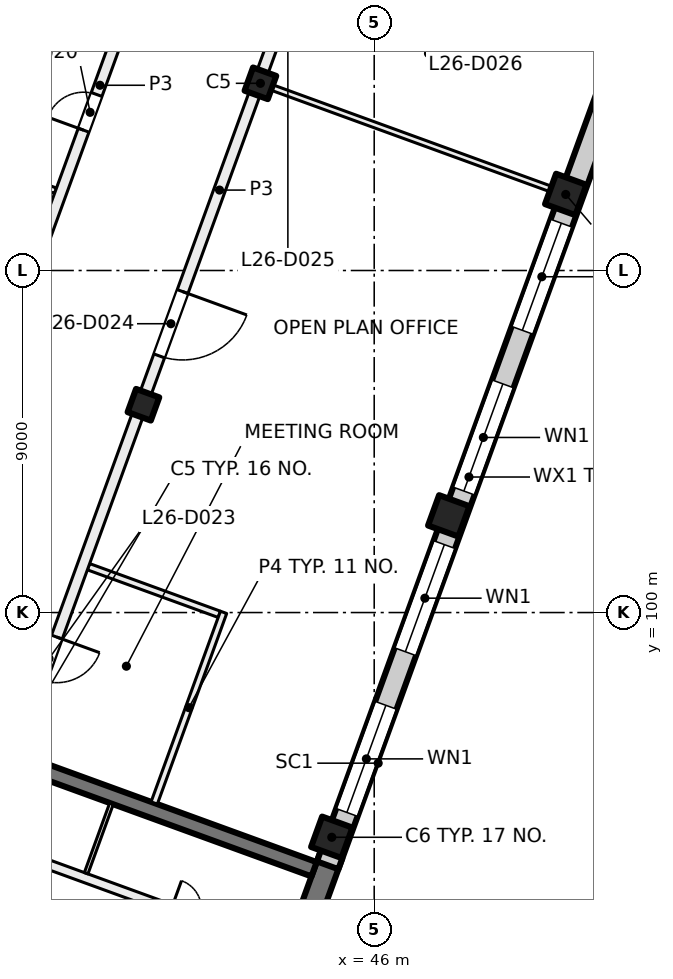
"""IFC4 building model, lengths in metres.
Left out: names, types, materials, properties, quantities, classifications, styles, units other than length and angle.
Written with IfcOpenShell. Run it as: python <this file> out.ifc"""

import sys

from ifc_helpers import new_model, si_unit, direction, frame, frame_2d, origin, origin_2d, place, context, subcontext, project, spatial, rectangle, extrude, element, fill, save


model = new_model("IFC4")
c1 = context("Model", 3, precision=1e-05, world=origin(), true_north=direction((0.0, 1.0)))
c2 = subcontext(c1, "Body", "Model", "MODEL_VIEW")
j1 = project(units=[si_unit("LENGTHUNIT", "METRE"), si_unit("PLANEANGLEUNIT", "RADIAN")], contexts=[c1])
p1 = place(None, origin())
s1 = spatial("IfcSite", under=j1, at=p1, CompositionType="ELEMENT")
p2 = place(p1, origin())
s2 = spatial("IfcBuilding", under=s1, at=p2, CompositionType="ELEMENT")
p3 = place(p2, frame((0.0, 0.0, 113.0)))
s3 = spatial("IfcBuildingStorey", under=s2, at=p3, CompositionType="ELEMENT", Elevation=113.0)
for number, where, z_axis, x_axis in (
    (1, (43.006, 113.925, 0.0), (0.0, 0.0, 1.0), (-0.342, -0.94, 0.0)),
    (2, (39.927, 105.468, 0.0), (0.0, 0.0, 1.0), (-0.342, -0.94, 0.0)),
):
    element("IfcColumn", number, at=place(p3, frame(where, z_axis=z_axis, x_axis=x_axis)), inside=s3, PredefinedType="COLUMN", context=c2, shape_type="SweptSolid", body=[
        extrude(rectangle(XDim=0.65, YDim=0.65, at=origin_2d()), origin(), (0.0, 0.0, 1.0), 4.0),
    ])
for number, where, z_axis, x_axis in (
    (3, (51.04, 111.001, 0.0), (0.0, 0.0, 1.0), (-0.342, -0.94, 0.0)),
    (4, (47.962, 102.544, 0.0), (0.0, 0.0, 1.0), (-0.342, -0.94, 0.0)),
    (5, (44.884, 94.087, 0.0), (0.0, 0.0, 1.0), (-0.342, -0.94, 0.0)),
):
    element("IfcColumn", number, at=place(p3, frame(where, z_axis=z_axis, x_axis=x_axis)), inside=s3, PredefinedType="COLUMN", context=c2, shape_type="SweptSolid", body=[
        extrude(rectangle(XDim=0.85, YDim=0.85, at=origin_2d()), origin(), (0.0, 0.0, 1.0), 4.0),
    ])
p4 = place(p3, frame((41.827, 85.249, 0.0), z_axis=(0.0, 0.0, 1.0), x_axis=(0.342017595281, 0.939693548195, 0.0)))
e6 = element("IfcWall", 6, at=p4, inside=s3, PredefinedType="SHEAR", context=c2, shape_type="SweptSolid", body=[
    extrude(rectangle(XDim=8.925, YDim=0.6, at=frame_2d((4.462, 0.0))), origin(), (0.0, 0.0, 1.0), 4.0),
])
p5 = place(p3, frame((44.418, 93.245, 0.0), z_axis=(0.0, 0.0, 1.0), x_axis=(-0.93969060187, 0.342025690201, 0.0)))
e7 = element("IfcWall", 7, at=p5, inside=s3, PredefinedType="SHEAR", context=c2, shape_type="SweptSolid", body=[
    extrude(rectangle(XDim=8.6, YDim=0.4, at=frame_2d((4.3, 0.0))), origin(), (0.0, 0.0, 1.0), 4.0),
])
p6 = place(p3, frame((52.212, 113.783, 0.0), z_axis=(0.0, 0.0, 1.0), x_axis=(-0.34202521188, -0.939690775968, 0.0)))
e8 = element("IfcWall", 8, at=p6, inside=s3, PredefinedType="SOLIDWALL", context=c2, shape_type="SweptSolid", body=[
    extrude(rectangle(XDim=21.745, YDim=0.6, at=frame_2d((10.873, 0.0))), origin(), (0.0, 0.0, 1.0), 3.625),
])
p7 = place(p6, frame((3.765, 0.0, 0.9)))
e9 = element("IfcOpeningElement", 9, at=p7, cuts=e8, PredefinedType="OPENING", context=c2, shape_type="SweptSolid", body=[
    extrude(rectangle(XDim=3.0, YDim=2.4, at=frame_2d((1.5, 1.2))), frame((0.0, 0.31, 0.0), z_axis=(0.0, -1.0, 0.0), x_axis=(1.0, 0.0, 0.0)), (0.0, 0.0, 1.0), 0.62),
])
p8 = place(p6, frame((8.265, 0.0, 0.9)))
e10 = element("IfcOpeningElement", 10, at=p8, cuts=e8, PredefinedType="OPENING", context=c2, shape_type="SweptSolid", body=[
    extrude(rectangle(XDim=3.0, YDim=2.4, at=frame_2d((1.5, 1.2))), frame((0.0, 0.31, 0.0), z_axis=(0.0, -1.0, 0.0), x_axis=(1.0, 0.0, 0.0)), (0.0, 0.0, 1.0), 0.62),
])
p9 = place(p6, frame((12.765, 0.0, 0.9)))
e11 = element("IfcOpeningElement", 11, at=p9, cuts=e8, PredefinedType="OPENING", context=c2, shape_type="SweptSolid", body=[
    extrude(rectangle(XDim=3.0, YDim=2.4, at=frame_2d((1.5, 1.2))), frame((0.0, 0.31, 0.0), z_axis=(0.0, -1.0, 0.0), x_axis=(1.0, 0.0, 0.0)), (0.0, 0.0, 1.0), 0.62),
])
p10 = place(p6, frame((17.265, 0.0, 0.9)))
e12 = element("IfcOpeningElement", 12, at=p10, cuts=e8, PredefinedType="OPENING", context=c2, shape_type="SweptSolid", body=[
    extrude(rectangle(XDim=3.0, YDim=2.4, at=frame_2d((1.5, 1.2))), frame((0.0, 0.31, 0.0), z_axis=(0.0, -1.0, 0.0), x_axis=(1.0, 0.0, 0.0)), (0.0, 0.0, 1.0), 0.62),
])
p11 = place(p3, frame((35.19, 92.453, 0.0), z_axis=(0.0, 0.0, 1.0), x_axis=(0.939691552312, -0.342023078919, 0.0)))
e13 = element("IfcWall", 13, at=p11, inside=s3, PredefinedType="PARTITIONING", context=c2, shape_type="SweptSolid", body=[
    extrude(rectangle(XDim=8.4, YDim=0.2, at=frame_2d((4.2, 0.0))), origin(), (0.0, 0.0, 1.0), 3.625),
])
p12 = place(p11, frame((5.25, 0.0, 0.0)))
e14 = element("IfcOpeningElement", 14, at=p12, cuts=e13, PredefinedType="OPENING", context=c2, shape_type="SweptSolid", body=[
    extrude(rectangle(XDim=1.5, YDim=2.1, at=frame_2d((0.75, 1.05))), frame((0.0, 0.11, 0.0), z_axis=(0.0, -1.0, 0.0), x_axis=(1.0, 0.0, 0.0)), (0.0, 0.0, 1.0), 0.22),
])
p13 = place(p3, frame((35.746, 93.98, 0.0), z_axis=(0.0, 0.0, 1.0), x_axis=(0.939691552312, -0.342023078919, 0.0)))
e15 = element("IfcWall", 15, at=p13, inside=s3, PredefinedType="PARTITIONING", context=c2, shape_type="SweptSolid", body=[
    extrude(rectangle(XDim=8.4, YDim=0.25, at=frame_2d((4.2, 0.0))), origin(), (0.0, 0.0, 1.0), 3.625),
])
p14 = place(p13, frame((0.975, 0.0, 0.0)))
e16 = element("IfcOpeningElement", 16, at=p14, cuts=e15, PredefinedType="OPENING", context=c2, shape_type="SweptSolid", body=[
    extrude(rectangle(XDim=0.8, YDim=2.1, at=frame_2d((0.4, 1.05))), frame((0.0, 0.135, 0.0), z_axis=(0.0, -1.0, 0.0), x_axis=(1.0, 0.0, 0.0)), (0.0, 0.0, 1.0), 0.27),
])
p15 = place(p13, frame((5.225, 0.0, 0.0)))
e17 = element("IfcOpeningElement", 17, at=p15, cuts=e15, PredefinedType="OPENING", context=c2, shape_type="SweptSolid", body=[
    extrude(rectangle(XDim=0.8, YDim=2.1, at=frame_2d((0.4, 1.05))), frame((0.0, 0.135, 0.0), z_axis=(0.0, -1.0, 0.0), x_axis=(1.0, 0.0, 0.0)), (0.0, 0.0, 1.0), 0.27),
])
p16 = place(p3, frame((39.087, 94.973, 0.0), z_axis=(0.0, 0.0, 1.0), x_axis=(-0.342024501273, -0.939691034611, 0.0)))
e18 = element("IfcWall", 18, at=p16, inside=s3, PredefinedType="PARTITIONING", context=c2, shape_type="SweptSolid", body=[
    extrude(rectangle(XDim=1.95, YDim=0.1, at=frame_2d((0.975, 0.0))), origin(), (0.0, 0.0, 1.0), 3.625),
])
p17 = place(p3, frame((29.814, 113.938, 0.0), z_axis=(0.0, 0.0, 1.0), x_axis=(0.939697205528, -0.342007546586, 0.0)))
e19 = element("IfcWall", 19, at=p17, inside=s3, PredefinedType="PARTITIONING", context=c2, shape_type="SweptSolid", body=[
    extrude(rectangle(XDim=8.301, YDim=0.15, at=frame_2d((4.15, 0.0))), origin(), (0.0, 0.0, 1.0), 3.625),
])
p18 = place(p3, frame((32.881, 97.657, 0.0), z_axis=(0.0, 0.0, 1.0), x_axis=(0.342017360004, 0.939693633828, 0.0)))
e20 = element("IfcWall", 20, at=p18, inside=s3, PredefinedType="PARTITIONING", context=c2, shape_type="SweptSolid", body=[
    extrude(rectangle(XDim=34.516, YDim=0.3, at=frame_2d((17.258, 0.0))), origin(), (0.0, 0.0, 1.0), 3.625),
])
p19 = place(p18, frame((2.025, 0.0, 0.0)))
e21 = element("IfcOpeningElement", 21, at=p19, cuts=e20, PredefinedType="OPENING", context=c2, shape_type="SweptSolid", body=[
    extrude(rectangle(XDim=1.2, YDim=2.1, at=frame_2d((0.6, 1.05))), frame((0.0, 0.16, 0.0), z_axis=(0.0, -1.0, 0.0), x_axis=(1.0, 0.0, 0.0)), (0.0, 0.0, 1.0), 0.32),
])
p20 = place(p18, frame((7.0, 0.0, 0.0)))
e22 = element("IfcOpeningElement", 22, at=p20, cuts=e20, PredefinedType="OPENING", context=c2, shape_type="SweptSolid", body=[
    extrude(rectangle(XDim=1.0, YDim=2.1, at=frame_2d((0.5, 1.05))), frame((0.0, 0.16, 0.0), z_axis=(0.0, -1.0, 0.0), x_axis=(1.0, 0.0, 0.0)), (0.0, 0.0, 1.0), 0.32),
])
p21 = place(p18, frame((11.5, 0.0, 0.0)))
e23 = element("IfcOpeningElement", 23, at=p21, cuts=e20, PredefinedType="OPENING", context=c2, shape_type="SweptSolid", body=[
    extrude(rectangle(XDim=1.0, YDim=2.1, at=frame_2d((0.5, 1.05))), frame((0.0, 0.16, 0.0), z_axis=(0.0, -1.0, 0.0), x_axis=(1.0, 0.0, 0.0)), (0.0, 0.0, 1.0), 0.32),
])
p22 = place(p18, frame((16.0, 0.0, 0.0)))
e24 = element("IfcOpeningElement", 24, at=p22, cuts=e20, PredefinedType="OPENING", context=c2, shape_type="SweptSolid", body=[
    extrude(rectangle(XDim=1.0, YDim=2.1, at=frame_2d((0.5, 1.05))), frame((0.0, 0.16, 0.0), z_axis=(0.0, -1.0, 0.0), x_axis=(1.0, 0.0, 0.0)), (0.0, 0.0, 1.0), 0.32),
])
p23 = place(p18, frame((20.5, 0.0, 0.0)))
e25 = element("IfcOpeningElement", 25, at=p23, cuts=e20, PredefinedType="OPENING", context=c2, shape_type="SweptSolid", body=[
    extrude(rectangle(XDim=1.0, YDim=2.1, at=frame_2d((0.5, 1.05))), frame((0.0, 0.16, 0.0), z_axis=(0.0, -1.0, 0.0), x_axis=(1.0, 0.0, 0.0)), (0.0, 0.0, 1.0), 0.32),
])
p24 = place(p18, frame((25.0, 0.0, 0.0)))
e26 = element("IfcOpeningElement", 26, at=p24, cuts=e20, PredefinedType="OPENING", context=c2, shape_type="SweptSolid", body=[
    extrude(rectangle(XDim=1.0, YDim=2.1, at=frame_2d((0.5, 1.05))), frame((0.0, 0.16, 0.0), z_axis=(0.0, -1.0, 0.0), x_axis=(1.0, 0.0, 0.0)), (0.0, 0.0, 1.0), 0.32),
])
p25 = place(p18, frame((29.779, 0.0, 0.0)))
e27 = element("IfcOpeningElement", 27, at=p25, cuts=e20, PredefinedType="OPENING", context=c2, shape_type="SweptSolid", body=[
    extrude(rectangle(XDim=1.8, YDim=2.1, at=frame_2d((0.9, 1.05))), frame((0.0, 0.16, 0.0), z_axis=(0.0, -1.0, 0.0), x_axis=(1.0, 0.0, 0.0)), (0.0, 0.0, 1.0), 0.32),
])
p26 = place(p3, frame((38.482, 101.206, 0.0), z_axis=(0.0, 0.0, 1.0), x_axis=(0.939662978983, -0.342101572531, 0.0)))
e28 = element("IfcWall", 28, at=p26, inside=s3, PredefinedType="PARTITIONING", context=c2, shape_type="SweptSolid", body=[
    extrude(rectangle(XDim=3.663, YDim=0.175, at=frame_2d((1.832, 0.0))), origin(), (0.0, 0.0, 1.0), 3.625),
])
p27 = place(p3, frame((42.036, 100.005, 0.0), z_axis=(0.0, 0.0, 1.0), x_axis=(-0.341908323648, -0.939733312286, 0.0)))
e29 = element("IfcWall", 29, at=p27, inside=s3, PredefinedType="PARTITIONING", context=c2, shape_type="SweptSolid", body=[
    extrude(rectangle(XDim=5.338, YDim=0.175, at=frame_2d((2.669, 0.0))), origin(), (0.0, 0.0, 1.0), 3.625),
])
p28 = place(p3, frame((43.1, 113.891, 0.0), z_axis=(0.0, 0.0, 1.0), x_axis=(0.939670544866, -0.342080790328, 0.0)))
e30 = element("IfcWall", 30, at=p28, inside=s3, PredefinedType="PARTITIONING", context=c2, shape_type="SweptSolid", body=[
    extrude(rectangle(XDim=8.3, YDim=0.15, at=frame_2d((4.15, 0.0))), origin(), (0.0, 0.0, 1.0), 3.625),
])
p29 = place(p3, frame((47.314, 125.909, 0.0), z_axis=(0.0, 0.0, 1.0), x_axis=(-0.342010770371, -0.939696032209, 0.0)))
e31 = element("IfcWall", 31, at=p29, inside=s3, PredefinedType="PARTITIONING", context=c2, shape_type="SweptSolid", body=[
    extrude(rectangle(XDim=31.485, YDim=0.3, at=frame_2d((15.742, 0.0))), origin(), (0.0, 0.0, 1.0), 3.625),
])
p30 = place(p29, frame((28.259, 0.0, 0.0)))
e32 = element("IfcOpeningElement", 32, at=p30, cuts=e31, PredefinedType="OPENING", context=c2, shape_type="SweptSolid", body=[
    extrude(rectangle(XDim=1.2, YDim=2.1, at=frame_2d((0.6, 1.05))), frame((0.0, 0.16, 0.0), z_axis=(0.0, -1.0, 0.0), x_axis=(1.0, 0.0, 0.0)), (0.0, 0.0, 1.0), 0.32),
])
p31 = place(p29, frame((18.584, 0.0, 0.0)))
e33 = element("IfcOpeningElement", 33, at=p31, cuts=e31, PredefinedType="OPENING", context=c2, shape_type="SweptSolid", body=[
    extrude(rectangle(XDim=1.8, YDim=2.1, at=frame_2d((0.9, 1.05))), frame((0.0, 0.16, 0.0), z_axis=(0.0, -1.0, 0.0), x_axis=(1.0, 0.0, 0.0)), (0.0, 0.0, 1.0), 0.32),
])
p32 = place(p29, frame((9.985, 0.0, 0.0)))
e34 = element("IfcOpeningElement", 34, at=p32, cuts=e31, PredefinedType="OPENING", context=c2, shape_type="SweptSolid", body=[
    extrude(rectangle(XDim=1.0, YDim=2.1, at=frame_2d((0.5, 1.05))), frame((0.0, 0.16, 0.0), z_axis=(0.0, -1.0, 0.0), x_axis=(1.0, 0.0, 0.0)), (0.0, 0.0, 1.0), 0.32),
])
p33 = place(p29, frame((5.484, 0.0, 0.0)))
e35 = element("IfcOpeningElement", 35, at=p33, cuts=e31, PredefinedType="OPENING", context=c2, shape_type="SweptSolid", body=[
    extrude(rectangle(XDim=1.0, YDim=2.1, at=frame_2d((0.5, 1.05))), frame((0.0, 0.16, 0.0), z_axis=(0.0, -1.0, 0.0), x_axis=(1.0, 0.0, 0.0)), (0.0, 0.0, 1.0), 0.32),
])
p34 = place(p7, origin())
e36 = element("IfcWindow", 36, at=p34, inside=s3, PartitioningType="SINGLE_PANEL", PredefinedType="WINDOW", context=c2, shape_type="SweptSolid", body=[
    extrude(rectangle(XDim=3.0, YDim=2.4, at=frame_2d((1.5, 1.2))), frame((0.0, 0.03, 0.0), z_axis=(0.0, -1.0, 0.0), x_axis=(1.0, 0.0, 0.0)), (0.0, 0.0, 1.0), 0.06),
])
fill(e9, e36)
p35 = place(p8, origin())
e37 = element("IfcWindow", 37, at=p35, inside=s3, PartitioningType="SINGLE_PANEL", PredefinedType="WINDOW", context=c2, shape_type="SweptSolid", body=[
    extrude(rectangle(XDim=3.0, YDim=2.4, at=frame_2d((1.5, 1.2))), frame((0.0, 0.03, 0.0), z_axis=(0.0, -1.0, 0.0), x_axis=(1.0, 0.0, 0.0)), (0.0, 0.0, 1.0), 0.06),
])
fill(e10, e37)
p36 = place(p9, origin())
e38 = element("IfcWindow", 38, at=p36, inside=s3, PartitioningType="SINGLE_PANEL", PredefinedType="WINDOW", context=c2, shape_type="SweptSolid", body=[
    extrude(rectangle(XDim=3.0, YDim=2.4, at=frame_2d((1.5, 1.2))), frame((0.0, 0.03, 0.0), z_axis=(0.0, -1.0, 0.0), x_axis=(1.0, 0.0, 0.0)), (0.0, 0.0, 1.0), 0.06),
])
fill(e11, e38)
p37 = place(p10, origin())
e39 = element("IfcWindow", 39, at=p37, inside=s3, PartitioningType="SINGLE_PANEL", PredefinedType="WINDOW", context=c2, shape_type="SweptSolid", body=[
    extrude(rectangle(XDim=3.0, YDim=2.4, at=frame_2d((1.5, 1.2))), frame((0.0, 0.03, 0.0), z_axis=(0.0, -1.0, 0.0), x_axis=(1.0, 0.0, 0.0)), (0.0, 0.0, 1.0), 0.06),
])
fill(e12, e39)
p38 = place(p22, origin())
e40 = element("IfcDoor", 40, at=p38, inside=s3, OperationType="SINGLE_SWING_LEFT", PredefinedType="DOOR", context=c2, shape_type="SweptSolid", body=[
    extrude(rectangle(XDim=1.0, YDim=2.1, at=frame_2d((0.5, 1.05))), frame((0.0, 0.025, 0.0), z_axis=(0.0, -1.0, 0.0), x_axis=(1.0, 0.0, 0.0)), (0.0, 0.0, 1.0), 0.05),
])
fill(e24, e40)
p39 = place(p30, origin())
e41 = element("IfcDoor", 41, at=p39, inside=s3, OperationType="DOUBLE_DOOR_SINGLE_SWING", PredefinedType="DOOR", context=c2, shape_type="SweptSolid", body=[
    extrude(rectangle(XDim=1.2, YDim=2.1, at=frame_2d((0.6, 1.05))), frame((0.0, 0.025, 0.0), z_axis=(0.0, -1.0, 0.0), x_axis=(1.0, 0.0, 0.0)), (0.0, 0.0, 1.0), 0.05),
])
fill(e32, e41)
p40 = place(p31, origin())
e42 = element("IfcDoor", 42, at=p40, inside=s3, OperationType="DOUBLE_DOOR_SINGLE_SWING", PredefinedType="DOOR", context=c2, shape_type="SweptSolid", body=[
    extrude(rectangle(XDim=1.8, YDim=2.1, at=frame_2d((0.9, 1.05))), frame((0.0, 0.025, 0.0), z_axis=(0.0, -1.0, 0.0), x_axis=(1.0, 0.0, 0.0)), (0.0, 0.0, 1.0), 0.05),
])
fill(e33, e42)
save(model, sys.argv[1])
